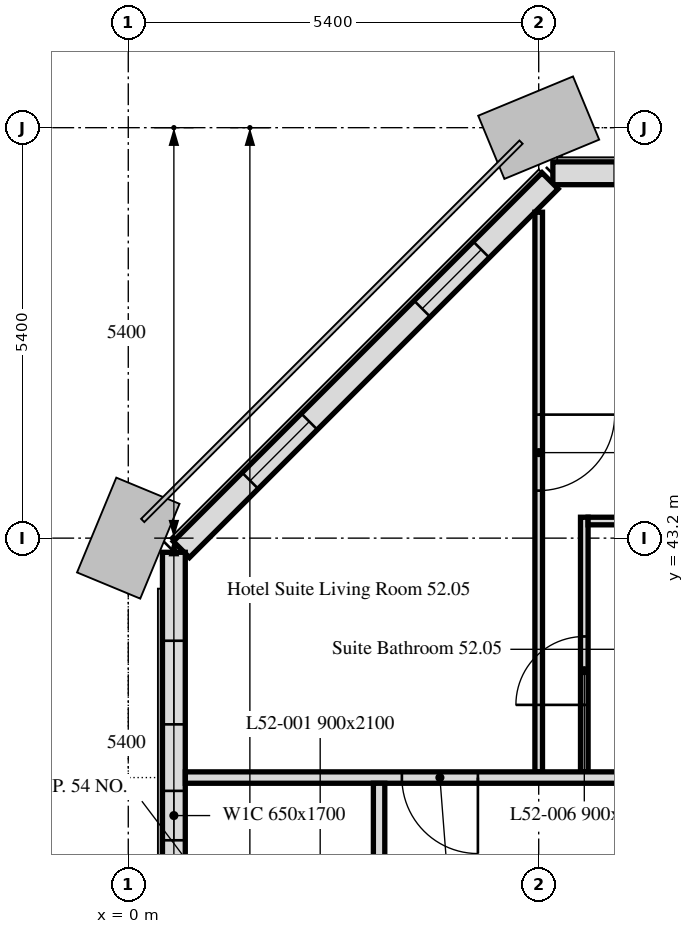
"""IFC4 building model, lengths in metres.
Left out: names, types, materials, properties, quantities, classifications, styles, units other than length and angle.
Written with IfcOpenShell. Run it as: python <this file> out.ifc"""

import sys

from ifc_helpers import new_model, si_unit, direction, frame, frame_2d, origin, place, context, subcontext, project, spatial, rectangle, extrude, element, fill, save


model = new_model("IFC4")
c1 = context("Model", 3, precision=1e-05, world=origin(), true_north=direction((0.0, 1.0)))
c2 = subcontext(c1, "Body", "Model", "MODEL_VIEW")
j1 = project(units=[si_unit("LENGTHUNIT", "METRE"), si_unit("PLANEANGLEUNIT", "RADIAN")], contexts=[c1])
p1 = place(None, origin())
s1 = spatial("IfcSite", under=j1, at=p1, CompositionType="ELEMENT")
p2 = place(p1, origin())
s2 = spatial("IfcBuilding", under=s1, at=p2, CompositionType="ELEMENT")
p3 = place(p2, frame((0.0, 0.0, 210.4)))
s3 = spatial("IfcBuildingStorey", under=s2, at=p3, CompositionType="ELEMENT", Elevation=210.4)
p4 = place(p3, frame((37.614, 48.0, 0.0), z_axis=(0.0, 0.0, 1.0), x_axis=(-1.0, 0.0, 0.0)))
e1 = element("IfcWall", 1, at=p4, inside=s3, PredefinedType="SOLIDWALL", context=c2, shape_type="SweptSolid", body=[
    extrude(rectangle(XDim=32.027, YDim=0.3, at=frame_2d((16.014, 0.0))), origin(), (0.0, 0.0, 1.0), 3.0),
])
p5 = place(p4, frame((2.764, 0.0, 0.9)))
e2 = element("IfcOpeningElement", 2, at=p5, cuts=e1, PredefinedType="OPENING", context=c2, shape_type="SweptSolid", body=[
    extrude(rectangle(XDim=1.1, YDim=1.7, at=frame_2d((0.55, 0.85))), frame((0.0, 0.16, 0.0), z_axis=(0.0, -1.0, 0.0), x_axis=(1.0, 0.0, 0.0)), (0.0, 0.0, 1.0), 0.32),
])
p6 = place(p4, frame((6.214, 0.0, 0.9)))
e3 = element("IfcOpeningElement", 3, at=p6, cuts=e1, PredefinedType="OPENING", context=c2, shape_type="SweptSolid", body=[
    extrude(rectangle(XDim=3.4, YDim=1.7, at=frame_2d((1.7, 0.85))), frame((0.0, 0.16, 0.0), z_axis=(0.0, -1.0, 0.0), x_axis=(1.0, 0.0, 0.0)), (0.0, 0.0, 1.0), 0.32),
])
p7 = place(p4, frame((13.564, 0.0, 0.9)))
e4 = element("IfcOpeningElement", 4, at=p7, cuts=e1, PredefinedType="OPENING", context=c2, shape_type="SweptSolid", body=[
    extrude(rectangle(XDim=1.1, YDim=1.7, at=frame_2d((0.55, 0.85))), frame((0.0, 0.16, 0.0), z_axis=(0.0, -1.0, 0.0), x_axis=(1.0, 0.0, 0.0)), (0.0, 0.0, 1.0), 0.32),
])
p8 = place(p4, frame((17.014, 0.0, 0.9)))
e5 = element("IfcOpeningElement", 5, at=p8, cuts=e1, PredefinedType="OPENING", context=c2, shape_type="SweptSolid", body=[
    extrude(rectangle(XDim=3.4, YDim=1.7, at=frame_2d((1.7, 0.85))), frame((0.0, 0.16, 0.0), z_axis=(0.0, -1.0, 0.0), x_axis=(1.0, 0.0, 0.0)), (0.0, 0.0, 1.0), 0.32),
])
p9 = place(p4, frame((24.364, 0.0, 0.9)))
e6 = element("IfcOpeningElement", 6, at=p9, cuts=e1, PredefinedType="OPENING", context=c2, shape_type="SweptSolid", body=[
    extrude(rectangle(XDim=1.1, YDim=1.7, at=frame_2d((0.55, 0.85))), frame((0.0, 0.16, 0.0), z_axis=(0.0, -1.0, 0.0), x_axis=(1.0, 0.0, 0.0)), (0.0, 0.0, 1.0), 0.32),
])
p10 = place(p4, frame((27.814, 0.0, 0.9)))
e7 = element("IfcOpeningElement", 7, at=p10, cuts=e1, PredefinedType="OPENING", context=c2, shape_type="SweptSolid", body=[
    extrude(rectangle(XDim=3.4, YDim=1.7, at=frame_2d((1.7, 0.85))), frame((0.0, 0.16, 0.0), z_axis=(0.0, -1.0, 0.0), x_axis=(1.0, 0.0, 0.0)), (0.0, 0.0, 1.0), 0.32),
])
p11 = place(p3, frame((5.55, 47.901, 0.0), z_axis=(0.0, 0.0, 1.0), x_axis=(-0.707106781187, -0.707106781187, 0.0)))
e8 = element("IfcWall", 8, at=p11, inside=s3, PredefinedType="SOLIDWALL", context=c2, shape_type="SweptSolid", body=[
    extrude(rectangle(XDim=6.86, YDim=0.3, at=frame_2d((3.43, 0.0))), origin(), (0.0, 0.0, 1.0), 3.0),
])
p12 = place(p11, frame((1.28, 0.0, 0.9)))
e9 = element("IfcOpeningElement", 9, at=p12, cuts=e8, PredefinedType="OPENING", context=c2, shape_type="SweptSolid", body=[
    extrude(rectangle(XDim=1.1, YDim=1.7, at=frame_2d((0.55, 0.85))), frame((0.0, 0.16, 0.0), z_axis=(0.0, -1.0, 0.0), x_axis=(1.0, 0.0, 0.0)), (0.0, 0.0, 1.0), 0.32),
])
p13 = place(p11, frame((4.48, 0.0, 0.9)))
e10 = element("IfcOpeningElement", 10, at=p13, cuts=e8, PredefinedType="OPENING", context=c2, shape_type="SweptSolid", body=[
    extrude(rectangle(XDim=1.1, YDim=1.7, at=frame_2d((0.55, 0.85))), frame((0.0, 0.16, 0.0), z_axis=(0.0, -1.0, 0.0), x_axis=(1.0, 0.0, 0.0)), (0.0, 0.0, 1.0), 0.32),
])
p14 = place(p3, frame((0.6, 43.014, 0.0), z_axis=(0.0, 0.0, 1.0), x_axis=(0.0, -1.0, 0.0)))
e11 = element("IfcWall", 11, at=p14, inside=s3, PredefinedType="SOLIDWALL", context=c2, shape_type="SweptSolid", body=[
    extrude(rectangle(XDim=32.027, YDim=0.3, at=frame_2d((16.014, 0.0))), origin(), (0.0, 0.0, 1.0), 3.0),
])
p15 = place(p14, frame((1.164, 0.0, 0.9)))
e12 = element("IfcOpeningElement", 12, at=p15, cuts=e11, PredefinedType="OPENING", context=c2, shape_type="SweptSolid", body=[
    extrude(rectangle(XDim=1.1, YDim=1.7, at=frame_2d((0.55, 0.85))), frame((0.0, 0.16, 0.0), z_axis=(0.0, -1.0, 0.0), x_axis=(1.0, 0.0, 0.0)), (0.0, 0.0, 1.0), 0.32),
])
p16 = place(p14, frame((3.139, 0.0, 0.9)))
e13 = element("IfcOpeningElement", 13, at=p16, cuts=e11, PredefinedType="OPENING", context=c2, shape_type="SweptSolid", body=[
    extrude(rectangle(XDim=0.65, YDim=1.7, at=frame_2d((0.325, 0.85))), frame((0.0, 0.16, 0.0), z_axis=(0.0, -1.0, 0.0), x_axis=(1.0, 0.0, 0.0)), (0.0, 0.0, 1.0), 0.32),
])
p17 = place(p14, frame((6.214, 0.0, 0.9)))
e14 = element("IfcOpeningElement", 14, at=p17, cuts=e11, PredefinedType="OPENING", context=c2, shape_type="SweptSolid", body=[
    extrude(rectangle(XDim=3.4, YDim=1.7, at=frame_2d((1.7, 0.85))), frame((0.0, 0.16, 0.0), z_axis=(0.0, -1.0, 0.0), x_axis=(1.0, 0.0, 0.0)), (0.0, 0.0, 1.0), 0.32),
])
p18 = place(p14, frame((11.964, 0.0, 0.9)))
e15 = element("IfcOpeningElement", 15, at=p18, cuts=e11, PredefinedType="OPENING", context=c2, shape_type="SweptSolid", body=[
    extrude(rectangle(XDim=1.1, YDim=1.7, at=frame_2d((0.55, 0.85))), frame((0.0, 0.16, 0.0), z_axis=(0.0, -1.0, 0.0), x_axis=(1.0, 0.0, 0.0)), (0.0, 0.0, 1.0), 0.32),
])
p19 = place(p14, frame((13.564, 0.0, 0.9)))
e16 = element("IfcOpeningElement", 16, at=p19, cuts=e11, PredefinedType="OPENING", context=c2, shape_type="SweptSolid", body=[
    extrude(rectangle(XDim=1.1, YDim=1.7, at=frame_2d((0.55, 0.85))), frame((0.0, 0.16, 0.0), z_axis=(0.0, -1.0, 0.0), x_axis=(1.0, 0.0, 0.0)), (0.0, 0.0, 1.0), 0.32),
])
p20 = place(p14, frame((17.364, 0.0, 0.9)))
e17 = element("IfcOpeningElement", 17, at=p20, cuts=e11, PredefinedType="OPENING", context=c2, shape_type="SweptSolid", body=[
    extrude(rectangle(XDim=1.1, YDim=1.7, at=frame_2d((0.55, 0.85))), frame((0.0, 0.16, 0.0), z_axis=(0.0, -1.0, 0.0), x_axis=(1.0, 0.0, 0.0)), (0.0, 0.0, 1.0), 0.32),
])
p21 = place(p14, frame((18.964, 0.0, 0.9)))
e18 = element("IfcOpeningElement", 18, at=p21, cuts=e11, PredefinedType="OPENING", context=c2, shape_type="SweptSolid", body=[
    extrude(rectangle(XDim=1.1, YDim=1.7, at=frame_2d((0.55, 0.85))), frame((0.0, 0.16, 0.0), z_axis=(0.0, -1.0, 0.0), x_axis=(1.0, 0.0, 0.0)), (0.0, 0.0, 1.0), 0.32),
])
p22 = place(p14, frame((22.764, 0.0, 0.9)))
e19 = element("IfcOpeningElement", 19, at=p22, cuts=e11, PredefinedType="OPENING", context=c2, shape_type="SweptSolid", body=[
    extrude(rectangle(XDim=1.1, YDim=1.7, at=frame_2d((0.55, 0.85))), frame((0.0, 0.16, 0.0), z_axis=(0.0, -1.0, 0.0), x_axis=(1.0, 0.0, 0.0)), (0.0, 0.0, 1.0), 0.32),
])
p23 = place(p14, frame((24.364, 0.0, 0.9)))
e20 = element("IfcOpeningElement", 20, at=p23, cuts=e11, PredefinedType="OPENING", context=c2, shape_type="SweptSolid", body=[
    extrude(rectangle(XDim=1.1, YDim=1.7, at=frame_2d((0.55, 0.85))), frame((0.0, 0.16, 0.0), z_axis=(0.0, -1.0, 0.0), x_axis=(1.0, 0.0, 0.0)), (0.0, 0.0, 1.0), 0.32),
])
p24 = place(p14, frame((28.164, 0.0, 0.9)))
e21 = element("IfcOpeningElement", 21, at=p24, cuts=e11, PredefinedType="OPENING", context=c2, shape_type="SweptSolid", body=[
    extrude(rectangle(XDim=1.1, YDim=1.7, at=frame_2d((0.55, 0.85))), frame((0.0, 0.16, 0.0), z_axis=(0.0, -1.0, 0.0), x_axis=(1.0, 0.0, 0.0)), (0.0, 0.0, 1.0), 0.32),
])
p25 = place(p14, frame((29.764, 0.0, 0.9)))
e22 = element("IfcOpeningElement", 22, at=p25, cuts=e11, PredefinedType="OPENING", context=c2, shape_type="SweptSolid", body=[
    extrude(rectangle(XDim=1.1, YDim=1.7, at=frame_2d((0.55, 0.85))), frame((0.0, 0.16, 0.0), z_axis=(0.0, -1.0, 0.0), x_axis=(1.0, 0.0, 0.0)), (0.0, 0.0, 1.0), 0.32),
])
p26 = place(p3, frame((5.4, 47.488, 0.0), z_axis=(0.0, 0.0, 1.0), x_axis=(0.0, -1.0, 0.0)))
e23 = element("IfcWall", 23, at=p26, inside=s3, PredefinedType="PARTITIONING", context=c2, shape_type="SweptSolid", body=[
    extrude(rectangle(XDim=7.363, YDim=0.1, at=frame_2d((3.681, 0.0))), origin(), (0.0, 0.0, 1.0), 3.0),
])
p27 = place(p26, frame((2.663, 0.0, 0.0)))
e24 = element("IfcOpeningElement", 24, at=p27, cuts=e23, PredefinedType="OPENING", context=c2, shape_type="SweptSolid", body=[
    extrude(rectangle(XDim=1.0, YDim=2.1, at=frame_2d((0.5, 1.05))), frame((0.0, 0.05, 0.0), z_axis=(0.0, -1.0, 0.0), x_axis=(1.0, 0.0, 0.0)), (0.0, 0.0, 1.0), 0.1),
])
p28 = place(p3, frame((6.0, 40.125, 0.0), z_axis=(0.0, 0.0, 1.0), x_axis=(0.0, 1.0, 0.0)))
e25 = element("IfcWall", 25, at=p28, inside=s3, PredefinedType="PARTITIONING", context=c2, shape_type="SweptSolid", body=[
    extrude(rectangle(XDim=3.35, YDim=0.1, at=frame_2d((1.675, 0.0))), origin(), (0.0, 0.0, 1.0), 3.0),
])
p29 = place(p28, frame((0.881, 0.0, 0.0)))
e26 = element("IfcOpeningElement", 26, at=p29, cuts=e25, PredefinedType="OPENING", context=c2, shape_type="SweptSolid", body=[
    extrude(rectangle(XDim=0.9, YDim=2.1, at=frame_2d((0.45, 1.05))), frame((0.0, 0.05, 0.0), z_axis=(0.0, -1.0, 0.0), x_axis=(1.0, 0.0, 0.0)), (0.0, 0.0, 1.0), 0.1),
])
p30 = place(p3, frame((6.05, 43.425, 0.0), z_axis=(0.0, 0.0, 1.0), x_axis=(1.0, 0.0, 0.0)))
e27 = element("IfcWall", 27, at=p30, inside=s3, PredefinedType="PARTITIONING", context=c2, shape_type="SweptSolid", body=[
    extrude(rectangle(XDim=2.4, YDim=0.1, at=frame_2d((1.2, 0.0))), origin(), (0.0, 0.0, 1.0), 3.0),
])
p31 = place(p3, frame((42.449, 40.05, 0.0), z_axis=(0.0, 0.0, 1.0), x_axis=(-1.0, 0.0, 0.0)))
e28 = element("IfcWall", 28, at=p31, inside=s3, PredefinedType="PARTITIONING", context=c2, shape_type="SweptSolid", body=[
    extrude(rectangle(XDim=41.698, YDim=0.15, at=frame_2d((20.849, 0.0))), origin(), (0.0, 0.0, 1.0), 2.4),
])
p32 = place(p31, frame((2.249, 0.0, 0.0)))
e29 = element("IfcOpeningElement", 29, at=p32, cuts=e28, PredefinedType="OPENING", context=c2, shape_type="SweptSolid", body=[
    extrude(rectangle(XDim=1.0, YDim=2.1, at=frame_2d((0.5, 1.05))), frame((0.0, 0.075, 0.0), z_axis=(0.0, -1.0, 0.0), x_axis=(1.0, 0.0, 0.0)), (0.0, 0.0, 1.0), 0.15),
])
p33 = place(p31, frame((6.849, 0.0, 0.0)))
e30 = element("IfcOpeningElement", 30, at=p33, cuts=e28, PredefinedType="OPENING", context=c2, shape_type="SweptSolid", body=[
    extrude(rectangle(XDim=1.0, YDim=2.1, at=frame_2d((0.5, 1.05))), frame((0.0, 0.075, 0.0), z_axis=(0.0, -1.0, 0.0), x_axis=(1.0, 0.0, 0.0)), (0.0, 0.0, 1.0), 0.15),
])
p34 = place(p31, frame((18.449, 0.0, 0.0)))
e31 = element("IfcOpeningElement", 31, at=p34, cuts=e28, PredefinedType="OPENING", context=c2, shape_type="SweptSolid", body=[
    extrude(rectangle(XDim=1.0, YDim=2.1, at=frame_2d((0.5, 1.05))), frame((0.0, 0.075, 0.0), z_axis=(0.0, -1.0, 0.0), x_axis=(1.0, 0.0, 0.0)), (0.0, 0.0, 1.0), 0.15),
])
p35 = place(p31, frame((23.049, 0.0, 0.0)))
e32 = element("IfcOpeningElement", 32, at=p35, cuts=e28, PredefinedType="OPENING", context=c2, shape_type="SweptSolid", body=[
    extrude(rectangle(XDim=1.0, YDim=2.1, at=frame_2d((0.5, 1.05))), frame((0.0, 0.075, 0.0), z_axis=(0.0, -1.0, 0.0), x_axis=(1.0, 0.0, 0.0)), (0.0, 0.0, 1.0), 0.15),
])
p36 = place(p31, frame((37.849, 0.0, 0.0)))
e33 = element("IfcOpeningElement", 33, at=p36, cuts=e28, PredefinedType="OPENING", context=c2, shape_type="SweptSolid", body=[
    extrude(rectangle(XDim=1.0, YDim=2.1, at=frame_2d((0.5, 1.05))), frame((0.0, 0.075, 0.0), z_axis=(0.0, -1.0, 0.0), x_axis=(1.0, 0.0, 0.0)), (0.0, 0.0, 1.0), 0.15),
])
p37 = place(p3, frame((3.3, 11.775, 0.0), z_axis=(0.0, 0.0, 1.0), x_axis=(0.0, 1.0, 0.0)))
e34 = element("IfcWall", 34, at=p37, inside=s3, PredefinedType="PARTITIONING", context=c2, shape_type="SweptSolid", body=[
    extrude(rectangle(XDim=28.2, YDim=0.15, at=frame_2d((14.1, 0.0))), origin(), (0.0, 0.0, 1.0), 2.4),
])
p38 = place(p37, frame((17.425, 0.0, 0.0)))
e35 = element("IfcOpeningElement", 35, at=p38, cuts=e34, PredefinedType="OPENING", context=c2, shape_type="SweptSolid", body=[
    extrude(rectangle(XDim=1.0, YDim=2.1, at=frame_2d((0.5, 1.05))), frame((0.0, 0.075, 0.0), z_axis=(0.0, -1.0, 0.0), x_axis=(1.0, 0.0, 0.0)), (0.0, 0.0, 1.0), 0.15),
])
p39 = place(p37, frame((1.675, 0.0, 0.0)))
e36 = element("IfcOpeningElement", 36, at=p39, cuts=e34, PredefinedType="OPENING", context=c2, shape_type="SweptSolid", body=[
    extrude(rectangle(XDim=1.0, YDim=2.1, at=frame_2d((0.5, 1.05))), frame((0.0, 0.075, 0.0), z_axis=(0.0, -1.0, 0.0), x_axis=(1.0, 0.0, 0.0)), (0.0, 0.0, 1.0), 0.15),
])
p40 = place(p37, frame((22.6, 0.0, 0.0)))
e37 = element("IfcOpeningElement", 37, at=p40, cuts=e34, PredefinedType="OPENING", context=c2, shape_type="SweptSolid", body=[
    extrude(rectangle(XDim=1.0, YDim=2.1, at=frame_2d((0.5, 1.05))), frame((0.0, 0.075, 0.0), z_axis=(0.0, -1.0, 0.0), x_axis=(1.0, 0.0, 0.0)), (0.0, 0.0, 1.0), 0.15),
])
p41 = place(p37, frame((7.975, 0.0, 0.0)))
e38 = element("IfcOpeningElement", 38, at=p41, cuts=e34, PredefinedType="OPENING", context=c2, shape_type="SweptSolid", body=[
    extrude(rectangle(XDim=1.0, YDim=2.1, at=frame_2d((0.5, 1.05))), frame((0.0, 0.075, 0.0), z_axis=(0.0, -1.0, 0.0), x_axis=(1.0, 0.0, 0.0)), (0.0, 0.0, 1.0), 0.15),
])
p42 = place(p12, origin())
e39 = element("IfcWindow", 39, at=p42, inside=s3, PartitioningType="SINGLE_PANEL", PredefinedType="WINDOW", context=c2, shape_type="SweptSolid", body=[
    extrude(rectangle(XDim=1.1, YDim=1.7, at=frame_2d((0.55, 0.85))), frame((0.0, 0.03, 0.0), z_axis=(0.0, -1.0, 0.0), x_axis=(1.0, 0.0, 0.0)), (0.0, 0.0, 1.0), 0.06),
])
fill(e9, e39)
p43 = place(p13, origin())
e40 = element("IfcWindow", 40, at=p43, inside=s3, PartitioningType="SINGLE_PANEL", PredefinedType="WINDOW", context=c2, shape_type="SweptSolid", body=[
    extrude(rectangle(XDim=1.1, YDim=1.7, at=frame_2d((0.55, 0.85))), frame((0.0, 0.03, 0.0), z_axis=(0.0, -1.0, 0.0), x_axis=(1.0, 0.0, 0.0)), (0.0, 0.0, 1.0), 0.06),
])
fill(e10, e40)
p44 = place(p15, origin())
e41 = element("IfcWindow", 41, at=p44, inside=s3, PartitioningType="SINGLE_PANEL", PredefinedType="WINDOW", context=c2, shape_type="SweptSolid", body=[
    extrude(rectangle(XDim=1.1, YDim=1.7, at=frame_2d((0.55, 0.85))), frame((0.0, 0.03, 0.0), z_axis=(0.0, -1.0, 0.0), x_axis=(1.0, 0.0, 0.0)), (0.0, 0.0, 1.0), 0.06),
])
fill(e12, e41)
p45 = place(p16, origin())
e42 = element("IfcWindow", 42, at=p45, inside=s3, PartitioningType="SINGLE_PANEL", PredefinedType="WINDOW", context=c2, shape_type="SweptSolid", body=[
    extrude(rectangle(XDim=0.65, YDim=1.7, at=frame_2d((0.325, 0.85))), frame((0.0, 0.03, 0.0), z_axis=(0.0, -1.0, 0.0), x_axis=(1.0, 0.0, 0.0)), (0.0, 0.0, 1.0), 0.06),
])
fill(e13, e42)
p46 = place(p29, origin())
e43 = element("IfcDoor", 43, at=p46, inside=s3, OperationType="SINGLE_SWING_LEFT", PredefinedType="DOOR", context=c2, shape_type="SweptSolid", body=[
    extrude(rectangle(XDim=0.9, YDim=2.1, at=frame_2d((0.45, 1.05))), frame((0.0, 0.025, 0.0), z_axis=(0.0, -1.0, 0.0), x_axis=(1.0, 0.0, 0.0)), (0.0, 0.0, 1.0), 0.05),
])
fill(e26, e43)
p47 = place(p27, origin())
e44 = element("IfcDoor", 44, at=p47, inside=s3, OperationType="SINGLE_SWING_LEFT", PredefinedType="DOOR", context=c2, shape_type="SweptSolid", body=[
    extrude(rectangle(XDim=1.0, YDim=2.1, at=frame_2d((0.5, 1.05))), frame((0.0, 0.025, 0.0), z_axis=(0.0, -1.0, 0.0), x_axis=(1.0, 0.0, 0.0)), (0.0, 0.0, 1.0), 0.05),
])
fill(e24, e44)
p48 = place(p36, origin())
e45 = element("IfcDoor", 45, at=p48, inside=s3, OperationType="SINGLE_SWING_RIGHT", PredefinedType="DOOR", context=c2, shape_type="SweptSolid", body=[
    extrude(rectangle(XDim=1.0, YDim=2.1, at=frame_2d((0.5, 1.05))), frame((0.0, 0.025, 0.0), z_axis=(0.0, -1.0, 0.0), x_axis=(1.0, 0.0, 0.0)), (0.0, 0.0, 1.0), 0.05),
])
fill(e33, e45)
save(model, sys.argv[1])
